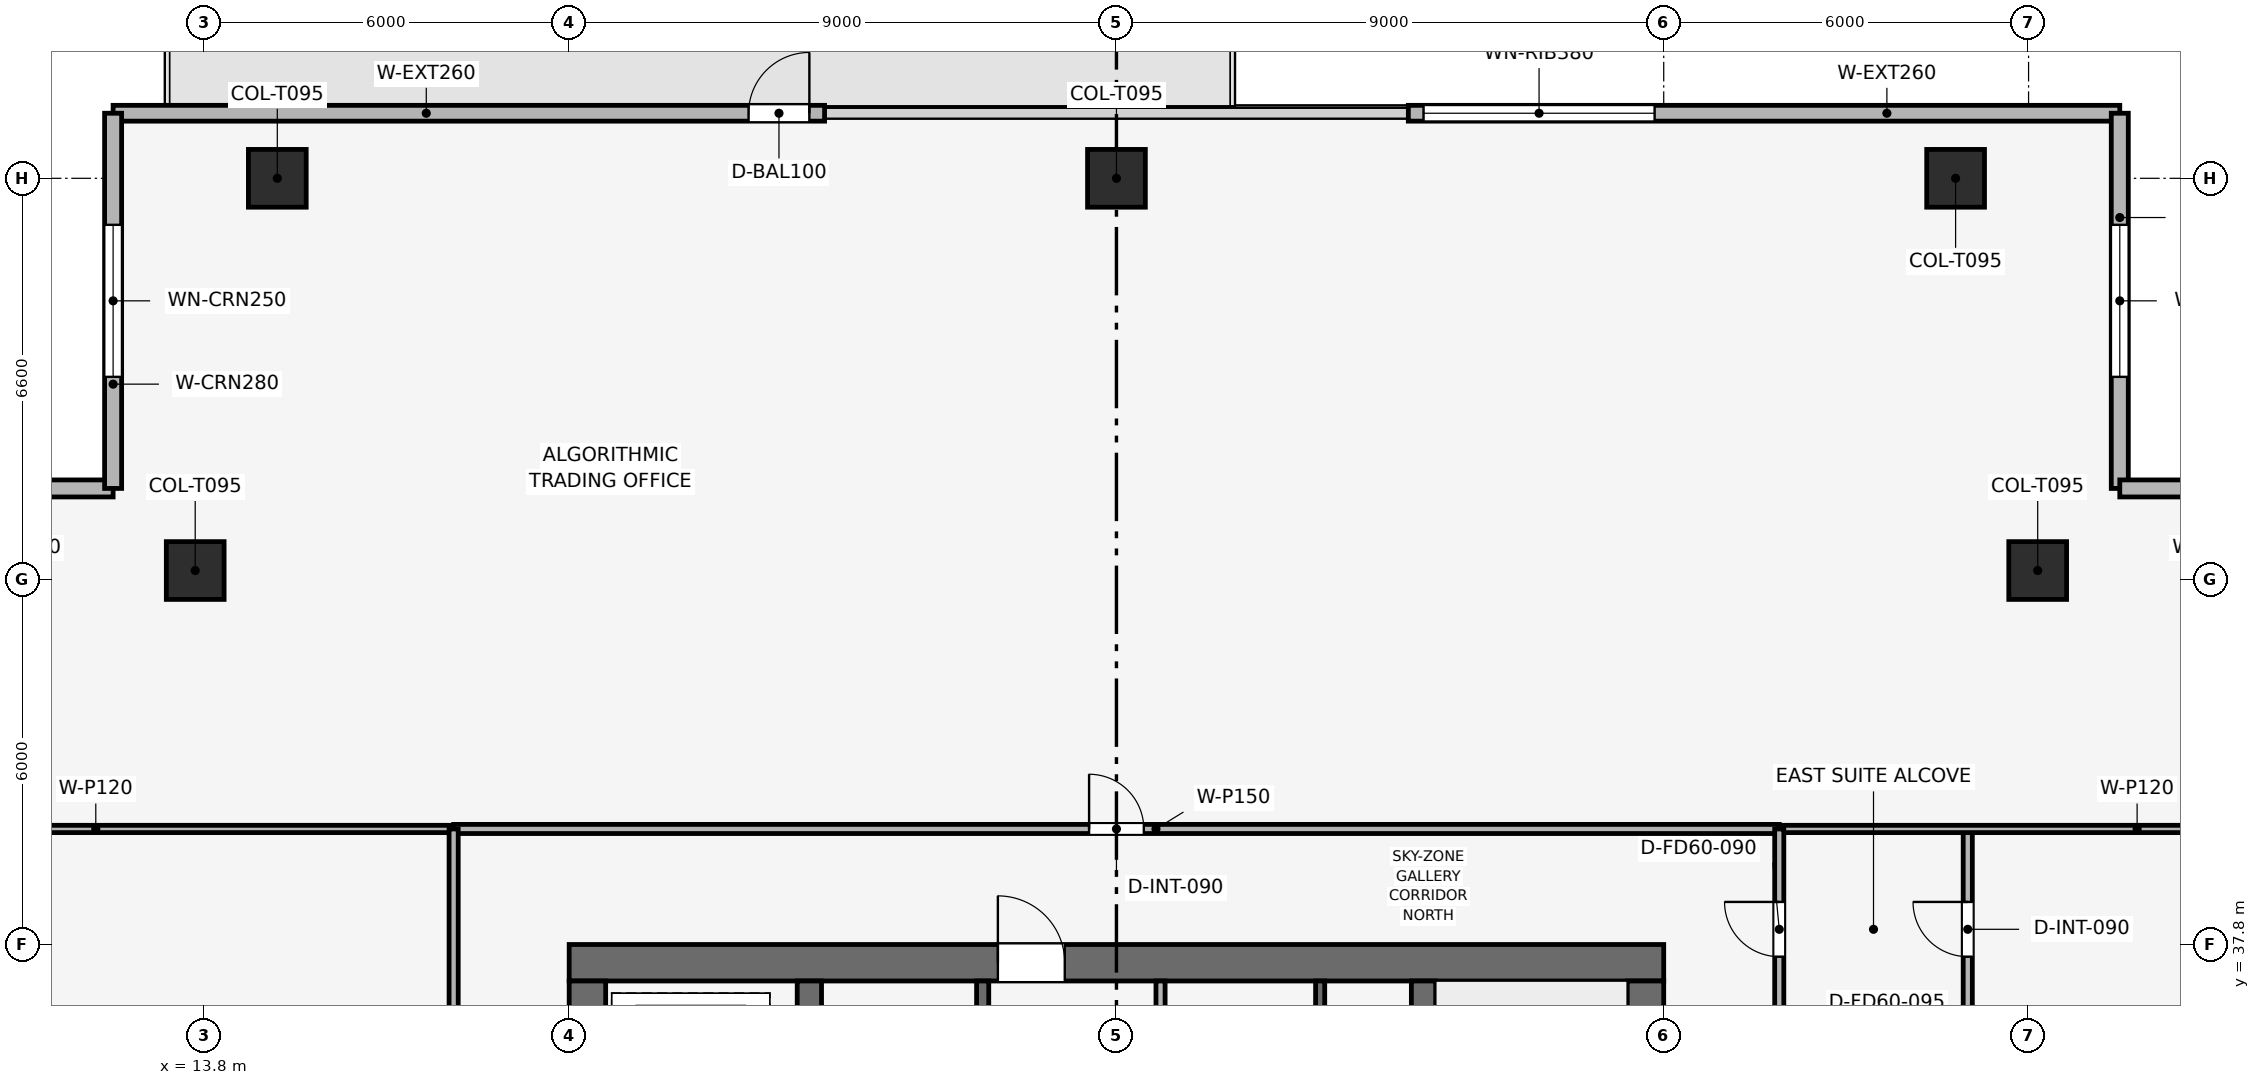
"""IFC4 building model, lengths in metres.
Left out: names, types, materials, properties, quantities, classifications, styles, units other than length and angle.
Written with IfcOpenShell. Run it as: python <this file> out.ifc"""

import sys

from ifc_helpers import new_model, si_unit, direction, frame, frame_2d, origin, origin_2d, place, context, subcontext, project, spatial, rectangle, extrude, element, fill, save


model = new_model("IFC4")
c1 = context("Model", 3, precision=1e-05, world=origin(), true_north=direction((0.0, 1.0)))
c2 = subcontext(c1, "Body", "Model", "MODEL_VIEW")
j1 = project(units=[si_unit("LENGTHUNIT", "METRE"), si_unit("PLANEANGLEUNIT", "RADIAN")], contexts=[c1])
p1 = place(None, origin())
s1 = spatial("IfcSite", under=j1, at=p1, CompositionType="ELEMENT")
p2 = place(p1, origin())
s2 = spatial("IfcBuilding", under=s1, at=p2, CompositionType="ELEMENT")
p3 = place(p2, frame((0.0, 0.0, 310.5)))
s3 = spatial("IfcBuildingStorey", under=s2, at=p3, CompositionType="ELEMENT", Elevation=310.5)
p4 = place(p3, frame((19.8, 37.5, 0.0), z_axis=(0.0, 0.0, 1.0), x_axis=(1.0, 0.0, 0.0)))
e1 = element("IfcWall", 1, at=p4, inside=s3, PredefinedType="SHEAR", context=c2, shape_type="SweptSolid", body=[
    extrude(rectangle(XDim=18.0, YDim=0.6, at=frame_2d((9.0, 0.0))), origin(), (0.0, 0.0, 1.0), 3.75),
])
p5 = place(p4, frame((7.05, 0.0, 0.0)))
e2 = element("IfcOpeningElement", 2, at=p5, cuts=e1, PredefinedType="OPENING", context=c2, shape_type="SweptSolid", body=[
    extrude(rectangle(XDim=1.1, YDim=2.15, at=frame_2d((0.55, 1.075))), frame((0.0, 0.31, 0.0), z_axis=(0.0, -1.0, 0.0), x_axis=(1.0, 0.0, 0.0)), (0.0, 0.0, 1.0), 0.62),
])
p6 = place(p3, frame((20.1, 20.4, 0.0), z_axis=(0.0, 0.0, 1.0), x_axis=(0.0, 1.0, 0.0)))
e3 = element("IfcWall", 3, at=p6, inside=s3, PredefinedType="SHEAR", context=c2, shape_type="SweptSolid", body=[
    extrude(rectangle(XDim=16.8, YDim=0.6, at=frame_2d((8.4, 0.0))), origin(), (0.0, 0.0, 1.0), 3.75),
])
p7 = place(p6, frame((10.4, 0.0, 0.0)))
e4 = element("IfcOpeningElement", 4, at=p7, cuts=e3, PredefinedType="OPENING", context=c2, shape_type="SweptSolid", body=[
    extrude(rectangle(XDim=1.1, YDim=2.15, at=frame_2d((0.55, 1.075))), frame((0.0, 0.31, 0.0), z_axis=(0.0, -1.0, 0.0), x_axis=(1.0, 0.0, 0.0)), (0.0, 0.0, 1.0), 0.62),
])
p8 = place(p3, frame((37.5, 20.4, 0.0), z_axis=(0.0, 0.0, 1.0), x_axis=(0.0, 1.0, 0.0)))
e5 = element("IfcWall", 5, at=p8, inside=s3, PredefinedType="SHEAR", context=c2, shape_type="SweptSolid", body=[
    extrude(rectangle(XDim=16.8, YDim=0.6, at=frame_2d((8.4, 0.0))), origin(), (0.0, 0.0, 1.0), 3.75),
])
p9 = place(p8, frame((4.9, 0.0, 0.0)))
e6 = element("IfcOpeningElement", 6, at=p9, cuts=e5, PredefinedType="OPENING", context=c2, shape_type="SweptSolid", body=[
    extrude(rectangle(XDim=1.1, YDim=2.15, at=frame_2d((0.55, 1.075))), frame((0.0, 0.31, 0.0), z_axis=(0.0, -1.0, 0.0), x_axis=(1.0, 0.0, 0.0)), (0.0, 0.0, 1.0), 0.62),
])
for number, where, z_axis, x_axis in (
    (7, (23.75, 20.4, 0.0), (0.0, 0.0, 1.0), (0.0, 1.0, 0.0)),
    (8, (33.85, 20.4, 0.0), (0.0, 0.0, 1.0), (0.0, 1.0, 0.0)),
):
    element("IfcWall", number, at=place(p3, frame(where, z_axis=z_axis, x_axis=x_axis)), inside=s3, PredefinedType="SHEAR", context=c2, shape_type="SweptSolid", body=[
        extrude(rectangle(XDim=16.8, YDim=0.4, at=frame_2d((8.4, 0.0))), origin(), (0.0, 0.0, 1.0), 3.75),
    ])
for number, where, z_axis, x_axis in (
    (9, (42.6, 50.4, 0.003), (0.0, 0.0, 1.0), (1.0, 0.0, 0.0)),
    (10, (28.8, 50.4, 0.003), (0.0, 0.0, 1.0), (1.0, 0.0, 0.0)),
    (11, (15.0, 50.4, 0.003), (0.0, 0.0, 1.0), (1.0, 0.0, 0.0)),
    (12, (43.95, 43.95, 0.003), (0.0, 0.0, 1.0), (1.0, 0.0, 0.0)),
    (13, (13.65, 43.95, 0.003), (0.0, 0.0, 1.0), (1.0, 0.0, 0.0)),
):
    element("IfcColumn", number, at=place(p3, frame(where, z_axis=z_axis, x_axis=x_axis)), inside=s3, PredefinedType="COLUMN", context=c2, shape_type="SweptSolid", body=[
        extrude(rectangle(XDim=0.95, YDim=0.95, at=origin_2d()), origin(), (0.0, 0.0, 1.0), 3.504),
    ])
p10 = place(p3, frame((12.3, 51.47, 0.0), z_axis=(0.0, 0.0, 1.0), x_axis=(1.0, 0.0, 0.0)))
e14 = element("IfcWall", 14, at=p10, inside=s3, PredefinedType="SOLIDWALL", context=c2, shape_type="SweptSolid", body=[
    extrude(rectangle(XDim=11.7, YDim=0.26, at=frame_2d((5.85, 0.0))), origin(), (0.0, 0.0, 1.0), 3.51),
])
p11 = place(p10, frame((10.45, 0.0, 0.0)))
e15 = element("IfcOpeningElement", 15, at=p11, cuts=e14, PredefinedType="OPENING", context=c2, shape_type="SweptSolid", body=[
    extrude(rectangle(XDim=1.0, YDim=2.2, at=frame_2d((0.5, 1.1))), frame((0.0, 0.14, 0.0), z_axis=(0.0, -1.0, 0.0), x_axis=(1.0, 0.0, 0.0)), (0.0, 0.0, 1.0), 0.28),
])
p12 = place(p3, frame((33.6, 51.47, 0.0), z_axis=(0.0, 0.0, 1.0), x_axis=(1.0, 0.0, 0.0)))
e16 = element("IfcWall", 16, at=p12, inside=s3, PredefinedType="SOLIDWALL", context=c2, shape_type="SweptSolid", body=[
    extrude(rectangle(XDim=11.7, YDim=0.26, at=frame_2d((5.85, 0.0))), origin(), (0.0, 0.0, 1.0), 3.51),
])
p13 = place(p12, frame((0.25, 0.0, 0.9)))
e17 = element("IfcOpeningElement", 17, at=p13, cuts=e16, PredefinedType="OPENING", context=c2, shape_type="SweptSolid", body=[
    extrude(rectangle(XDim=3.8, YDim=1.9, at=frame_2d((1.9, 0.95))), frame((0.0, 0.14, 0.0), z_axis=(0.0, -1.0, 0.0), x_axis=(1.0, 0.0, 0.0)), (0.0, 0.0, 1.0), 0.28),
])
p14 = place(p3, frame((6.13, 45.3, 0.0), z_axis=(0.0, 0.0, 1.0), x_axis=(1.0, 0.0, 0.0)))
e18 = element("IfcWall", 18, at=p14, inside=s3, PredefinedType="SOLIDWALL", context=c2, shape_type="SweptSolid", body=[
    extrude(rectangle(XDim=6.17, YDim=0.28, at=frame_2d((3.085, 0.0))), origin(), (0.0, 0.0, 1.0), 3.51),
])
p15 = place(p14, frame((1.835, 0.0, 0.9)))
e19 = element("IfcOpeningElement", 19, at=p15, cuts=e18, PredefinedType="OPENING", context=c2, shape_type="SweptSolid", body=[
    extrude(rectangle(XDim=2.5, YDim=1.9, at=frame_2d((1.25, 0.95))), frame((0.0, 0.15, 0.0), z_axis=(0.0, -1.0, 0.0), x_axis=(1.0, 0.0, 0.0)), (0.0, 0.0, 1.0), 0.3),
])
p16 = place(p3, frame((12.3, 45.3, 0.0), z_axis=(0.0, 0.0, 1.0), x_axis=(0.0, 1.0, 0.0)))
e20 = element("IfcWall", 20, at=p16, inside=s3, PredefinedType="SOLIDWALL", context=c2, shape_type="SweptSolid", body=[
    extrude(rectangle(XDim=6.17, YDim=0.28, at=frame_2d((3.085, 0.0))), origin(), (0.0, 0.0, 1.0), 3.51),
])
p17 = place(p16, frame((1.835, 0.0, 0.9)))
e21 = element("IfcOpeningElement", 21, at=p17, cuts=e20, PredefinedType="OPENING", context=c2, shape_type="SweptSolid", body=[
    extrude(rectangle(XDim=2.5, YDim=1.9, at=frame_2d((1.25, 0.95))), frame((0.0, 0.15, 0.0), z_axis=(0.0, -1.0, 0.0), x_axis=(1.0, 0.0, 0.0)), (0.0, 0.0, 1.0), 0.3),
])
p18 = place(p3, frame((45.3, 51.47, 0.0), z_axis=(0.0, 0.0, 1.0), x_axis=(0.0, -1.0, 0.0)))
e22 = element("IfcWall", 22, at=p18, inside=s3, PredefinedType="SOLIDWALL", context=c2, shape_type="SweptSolid", body=[
    extrude(rectangle(XDim=6.17, YDim=0.28, at=frame_2d((3.085, 0.0))), origin(), (0.0, 0.0, 1.0), 3.51),
])
p19 = place(p18, frame((1.835, 0.0, 0.9)))
e23 = element("IfcOpeningElement", 23, at=p19, cuts=e22, PredefinedType="OPENING", context=c2, shape_type="SweptSolid", body=[
    extrude(rectangle(XDim=2.5, YDim=1.9, at=frame_2d((1.25, 0.95))), frame((0.0, 0.15, 0.0), z_axis=(0.0, -1.0, 0.0), x_axis=(1.0, 0.0, 0.0)), (0.0, 0.0, 1.0), 0.3),
])
p20 = place(p3, frame((45.3, 45.3, 0.0), z_axis=(0.0, 0.0, 1.0), x_axis=(1.0, 0.0, 0.0)))
e24 = element("IfcWall", 24, at=p20, inside=s3, PredefinedType="SOLIDWALL", context=c2, shape_type="SweptSolid", body=[
    extrude(rectangle(XDim=6.17, YDim=0.28, at=frame_2d((3.085, 0.0))), origin(), (0.0, 0.0, 1.0), 3.51),
])
p21 = place(p20, frame((1.835, 0.0, 0.9)))
e25 = element("IfcOpeningElement", 25, at=p21, cuts=e24, PredefinedType="OPENING", context=c2, shape_type="SweptSolid", body=[
    extrude(rectangle(XDim=2.5, YDim=1.9, at=frame_2d((1.25, 0.95))), frame((0.0, 0.15, 0.0), z_axis=(0.0, -1.0, 0.0), x_axis=(1.0, 0.0, 0.0)), (0.0, 0.0, 1.0), 0.3),
])
p22 = place(p3, frame((32.15, 34.0, 0.0), z_axis=(0.0, 0.0, 1.0), x_axis=(0.0, 1.0, 0.0)))
e26 = element("IfcWall", 26, at=p22, inside=s3, PredefinedType="SHEAR", context=c2, shape_type="SweptSolid", body=[
    extrude(rectangle(XDim=3.2, YDim=0.15, at=frame_2d((1.6, 0.0))), origin(), (0.0, 0.0, 1.0), 3.51),
])
p23 = place(p3, frame((26.6, 34.0, 0.0), z_axis=(0.0, 0.0, 1.0), x_axis=(0.0, 1.0, 0.0)))
e27 = element("IfcWall", 27, at=p23, inside=s3, PredefinedType="SHEAR", context=c2, shape_type="SweptSolid", body=[
    extrude(rectangle(XDim=3.2, YDim=0.2, at=frame_2d((1.6, 0.0))), origin(), (0.0, 0.0, 1.0), 3.51),
])
p24 = place(p23, frame((0.75, 0.0, 0.0)))
e28 = element("IfcOpeningElement", 28, at=p24, cuts=e27, PredefinedType="OPENING", context=c2, shape_type="SweptSolid", body=[
    extrude(rectangle(XDim=1.1, YDim=2.15, at=frame_2d((0.55, 1.075))), frame((0.0, 0.11, 0.0), z_axis=(0.0, -1.0, 0.0), x_axis=(1.0, 0.0, 0.0)), (0.0, 0.0, 1.0), 0.22),
])
p25 = place(p3, frame((29.525, 33.925, 0.0), z_axis=(0.0, 0.0, 1.0), x_axis=(0.0, 1.0, 0.0)))
e29 = element("IfcWall", 29, at=p25, inside=s3, PredefinedType="PARTITIONING", context=c2, shape_type="SweptSolid", body=[
    extrude(rectangle(XDim=3.275, YDim=0.15, at=frame_2d((1.637, 0.0))), origin(), (0.0, 0.0, 1.0), 3.51),
])
p26 = place(p25, frame((0.85, 0.0, 0.0)))
e30 = element("IfcOpeningElement", 30, at=p26, cuts=e29, PredefinedType="OPENING", context=c2, shape_type="SweptSolid", body=[
    extrude(rectangle(XDim=0.9, YDim=2.1, at=frame_2d((0.45, 1.05))), frame((0.0, 0.085, 0.0), z_axis=(0.0, -1.0, 0.0), x_axis=(1.0, 0.0, 0.0)), (0.0, 0.0, 1.0), 0.17),
])
p27 = place(p3, frame((42.8, 28.0, 0.0), z_axis=(0.0, 0.0, 1.0), x_axis=(0.0, 1.0, 0.0)))
e31 = element("IfcWall", 31, at=p27, inside=s3, PredefinedType="PARTITIONING", context=c2, shape_type="SweptSolid", body=[
    extrude(rectangle(XDim=11.7, YDim=0.15, at=frame_2d((5.85, 0.0))), origin(), (0.0, 0.0, 1.0), 3.095),
])
p28 = place(p27, frame((9.6, 0.0, 0.0)))
e32 = element("IfcOpeningElement", 32, at=p28, cuts=e31, PredefinedType="OPENING", context=c2, shape_type="SweptSolid", body=[
    extrude(rectangle(XDim=0.9, YDim=2.1, at=frame_2d((0.45, 1.05))), frame((0.0, 0.085, 0.0), z_axis=(0.0, -1.0, 0.0), x_axis=(1.0, 0.0, 0.0)), (0.0, 0.0, 1.0), 0.17),
])
for number, where, z_axis, x_axis in (
    (33, (6.13, 39.7, 0.0), (0.0, 0.0, 1.0), (1.0, 0.0, 0.0)),
    (34, (39.7, 39.7, 0.0), (0.0, 0.0, 1.0), (1.0, 0.0, 0.0)),
):
    element("IfcWall", number, at=place(p3, frame(where, z_axis=z_axis, x_axis=x_axis)), inside=s3, PredefinedType="PARTITIONING", context=c2, shape_type="SweptSolid", body=[
        extrude(rectangle(XDim=11.77, YDim=0.12, at=frame_2d((5.885, 0.0))), origin(), (0.0, 0.0, 1.0), 3.095),
    ])
p29 = place(p3, frame((17.9, 39.7, 0.0), z_axis=(0.0, 0.0, 1.0), x_axis=(1.0, 0.0, 0.0)))
e35 = element("IfcWall", 35, at=p29, inside=s3, PredefinedType="PARTITIONING", context=c2, shape_type="SweptSolid", body=[
    extrude(rectangle(XDim=21.8, YDim=0.15, at=frame_2d((10.9, 0.0))), origin(), (0.0, 0.0, 1.0), 3.095),
])
p30 = place(p29, frame((10.45, 0.0, 0.0)))
e36 = element("IfcOpeningElement", 36, at=p30, cuts=e35, PredefinedType="OPENING", context=c2, shape_type="SweptSolid", body=[
    extrude(rectangle(XDim=0.9, YDim=2.1, at=frame_2d((0.45, 1.05))), frame((0.0, 0.085, 0.0), z_axis=(0.0, -1.0, 0.0), x_axis=(1.0, 0.0, 0.0)), (0.0, 0.0, 1.0), 0.17),
])
p31 = place(p3, frame((17.9, 12.3, 0.0), z_axis=(0.0, 0.0, 1.0), x_axis=(0.0, 1.0, 0.0)))
e37 = element("IfcWall", 37, at=p31, inside=s3, PredefinedType="PARTITIONING", context=c2, shape_type="SweptSolid", body=[
    extrude(rectangle(XDim=27.4, YDim=0.15, at=frame_2d((13.7, 0.0))), origin(), (0.0, 0.0, 1.0), 3.095),
])
p32 = place(p31, frame((1.498, 0.0, 0.0)))
e38 = element("IfcOpeningElement", 38, at=p32, cuts=e37, PredefinedType="OPENING", context=c2, shape_type="SweptSolid", body=[
    extrude(rectangle(XDim=0.9, YDim=2.1, at=frame_2d((0.45, 1.05))), frame((0.0, 0.085, 0.0), z_axis=(0.0, -1.0, 0.0), x_axis=(1.0, 0.0, 0.0)), (0.0, 0.0, 1.0), 0.17),
])
p33 = place(p31, frame((15.198, 0.0, 0.0)))
e39 = element("IfcOpeningElement", 39, at=p33, cuts=e37, PredefinedType="OPENING", context=c2, shape_type="SweptSolid", body=[
    extrude(rectangle(XDim=0.9, YDim=2.1, at=frame_2d((0.45, 1.05))), frame((0.0, 0.085, 0.0), z_axis=(0.0, -1.0, 0.0), x_axis=(1.0, 0.0, 0.0)), (0.0, 0.0, 1.0), 0.17),
])
p34 = place(p3, frame((39.7, 24.4, 0.0), z_axis=(0.0, 0.0, 1.0), x_axis=(0.0, 1.0, 0.0)))
e40 = element("IfcWall", 40, at=p34, inside=s3, PredefinedType="PARTITIONING", context=c2, shape_type="SweptSolid", body=[
    extrude(rectangle(XDim=15.3, YDim=0.15, at=frame_2d((7.65, 0.0))), origin(), (0.0, 0.0, 1.0), 3.095),
])
p35 = place(p34, frame((1.35, 0.0, 0.0)))
e41 = element("IfcOpeningElement", 41, at=p35, cuts=e40, PredefinedType="OPENING", context=c2, shape_type="SweptSolid", body=[
    extrude(rectangle(XDim=0.9, YDim=2.1, at=frame_2d((0.45, 1.05))), frame((0.0, 0.085, 0.0), z_axis=(0.0, -1.0, 0.0), x_axis=(1.0, 0.0, 0.0)), (0.0, 0.0, 1.0), 0.17),
])
p36 = place(p34, frame((4.55, 0.0, 0.0)))
e42 = element("IfcOpeningElement", 42, at=p36, cuts=e40, PredefinedType="OPENING", context=c2, shape_type="SweptSolid", body=[
    extrude(rectangle(XDim=0.9, YDim=2.1, at=frame_2d((0.45, 1.05))), frame((0.0, 0.085, 0.0), z_axis=(0.0, -1.0, 0.0), x_axis=(1.0, 0.0, 0.0)), (0.0, 0.0, 1.0), 0.17),
])
p37 = place(p34, frame((7.45, 0.0, 0.0)))
e43 = element("IfcOpeningElement", 43, at=p37, cuts=e40, PredefinedType="OPENING", context=c2, shape_type="SweptSolid", body=[
    extrude(rectangle(XDim=0.9, YDim=2.1, at=frame_2d((0.45, 1.05))), frame((0.0, 0.085, 0.0), z_axis=(0.0, -1.0, 0.0), x_axis=(1.0, 0.0, 0.0)), (0.0, 0.0, 1.0), 0.17),
])
p38 = place(p34, frame((10.2, 0.0, 0.0)))
e44 = element("IfcOpeningElement", 44, at=p38, cuts=e40, PredefinedType="OPENING", context=c2, shape_type="SweptSolid", body=[
    extrude(rectangle(XDim=0.95, YDim=2.1, at=frame_2d((0.475, 1.05))), frame((0.0, 0.085, 0.0), z_axis=(0.0, -1.0, 0.0), x_axis=(1.0, 0.0, 0.0)), (0.0, 0.0, 1.0), 0.17),
])
p39 = place(p34, frame((13.2, 0.0, 0.0)))
e45 = element("IfcOpeningElement", 45, at=p39, cuts=e40, PredefinedType="OPENING", context=c2, shape_type="SweptSolid", body=[
    extrude(rectangle(XDim=0.9, YDim=2.1, at=frame_2d((0.45, 1.05))), frame((0.0, 0.085, 0.0), z_axis=(0.0, -1.0, 0.0), x_axis=(1.0, 0.0, 0.0)), (0.0, 0.0, 1.0), 0.17),
])
p40 = place(p11, origin())
e46 = element("IfcDoor", 46, at=p40, inside=s3, OperationType="SINGLE_SWING_RIGHT", PredefinedType="DOOR", context=c2, shape_type="SweptSolid", body=[
    extrude(rectangle(XDim=1.0, YDim=2.2, at=frame_2d((0.5, 1.1))), frame((0.0, 0.025, 0.0), z_axis=(0.0, -1.0, 0.0), x_axis=(1.0, 0.0, 0.0)), (0.0, 0.0, 1.0), 0.05),
])
fill(e15, e46)
p41 = place(p13, origin())
e47 = element("IfcWindow", 47, at=p41, inside=s3, PartitioningType="SINGLE_PANEL", PredefinedType="WINDOW", context=c2, shape_type="SweptSolid", body=[
    extrude(rectangle(XDim=3.8, YDim=1.9, at=frame_2d((1.9, 0.95))), frame((0.0, 0.03, 0.0), z_axis=(0.0, -1.0, 0.0), x_axis=(1.0, 0.0, 0.0)), (0.0, 0.0, 1.0), 0.06),
])
fill(e17, e47)
p42 = place(p17, origin())
e48 = element("IfcWindow", 48, at=p42, inside=s3, PartitioningType="SINGLE_PANEL", PredefinedType="WINDOW", context=c2, shape_type="SweptSolid", body=[
    extrude(rectangle(XDim=2.5, YDim=1.9, at=frame_2d((1.25, 0.95))), frame((0.0, 0.03, 0.0), z_axis=(0.0, -1.0, 0.0), x_axis=(1.0, 0.0, 0.0)), (0.0, 0.0, 1.0), 0.06),
])
fill(e21, e48)
p43 = place(p19, origin())
e49 = element("IfcWindow", 49, at=p43, inside=s3, PartitioningType="SINGLE_PANEL", PredefinedType="WINDOW", context=c2, shape_type="SweptSolid", body=[
    extrude(rectangle(XDim=2.5, YDim=1.9, at=frame_2d((1.25, 0.95))), frame((0.0, 0.03, 0.0), z_axis=(0.0, -1.0, 0.0), x_axis=(1.0, 0.0, 0.0)), (0.0, 0.0, 1.0), 0.06),
])
fill(e23, e49)
p44 = place(p28, origin())
e50 = element("IfcDoor", 50, at=p44, inside=s3, OperationType="SINGLE_SWING_RIGHT", PredefinedType="DOOR", context=c2, shape_type="SweptSolid", body=[
    extrude(rectangle(XDim=0.9, YDim=2.1, at=frame_2d((0.45, 1.05))), frame((0.0, 0.025, 0.0), z_axis=(0.0, -1.0, 0.0), x_axis=(1.0, 0.0, 0.0)), (0.0, 0.0, 1.0), 0.05),
])
fill(e32, e50)
p45 = place(p30, origin())
e51 = element("IfcDoor", 51, at=p45, inside=s3, OperationType="SINGLE_SWING_LEFT", PredefinedType="DOOR", context=c2, shape_type="SweptSolid", body=[
    extrude(rectangle(XDim=0.9, YDim=2.1, at=frame_2d((0.45, 1.05))), frame((0.0, 0.025, 0.0), z_axis=(0.0, -1.0, 0.0), x_axis=(1.0, 0.0, 0.0)), (0.0, 0.0, 1.0), 0.05),
])
fill(e36, e51)
p46 = place(p39, origin())
e52 = element("IfcDoor", 52, at=p46, inside=s3, OperationType="SINGLE_SWING_RIGHT", PredefinedType="DOOR", context=c2, shape_type="SweptSolid", body=[
    extrude(rectangle(XDim=0.9, YDim=2.1, at=frame_2d((0.45, 1.05))), frame((0.0, 0.025, 0.0), z_axis=(0.0, -1.0, 0.0), x_axis=(1.0, 0.0, 0.0)), (0.0, 0.0, 1.0), 0.05),
])
fill(e45, e52)
p47 = place(p5, origin())
e53 = element("IfcDoor", 53, at=p47, inside=s3, OperationType="SINGLE_SWING_LEFT", PredefinedType="DOOR", context=c2, shape_type="SweptSolid", body=[
    extrude(rectangle(XDim=1.1, YDim=2.15, at=frame_2d((0.55, 1.075))), frame((0.0, 0.025, 0.0), z_axis=(0.0, -1.0, 0.0), x_axis=(1.0, 0.0, 0.0)), (0.0, 0.0, 1.0), 0.05),
])
fill(e2, e53)
save(model, sys.argv[1])
